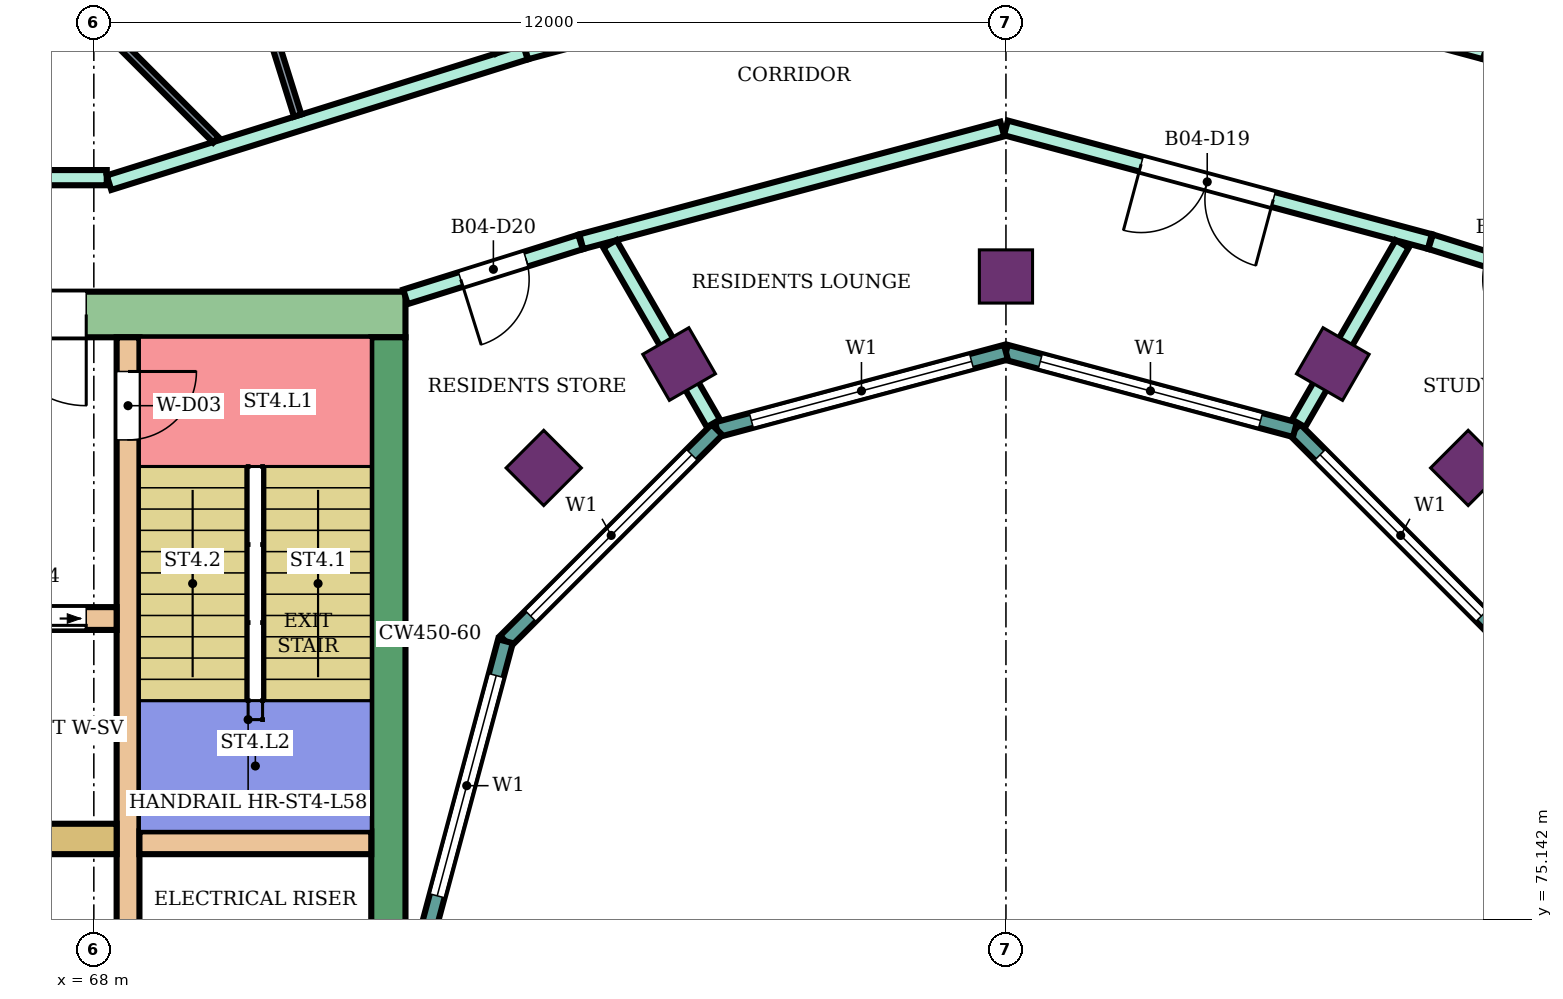
"""IFC4 building model, lengths in metres.
Left out: names, types, materials, properties, quantities, classifications, styles, units other than length and angle.
Written with IfcOpenShell. Run it as: python <this file> out.ifc"""

import sys

from ifc_helpers import new_model, si_unit, direction, frame, frame_2d, origin, origin_2d, place, context, subcontext, project, spatial, rectangle, extrude, element, fill, save


model = new_model("IFC4")
c1 = context("Model", 3, precision=1e-05, world=origin(), true_north=direction((0.0, 1.0)))
c2 = subcontext(c1, "Body", "Model", "MODEL_VIEW")
j1 = project(units=[si_unit("LENGTHUNIT", "METRE"), si_unit("PLANEANGLEUNIT", "RADIAN")], contexts=[c1])
p1 = place(None, origin())
s1 = spatial("IfcSite", under=j1, at=p1, CompositionType="ELEMENT")
p2 = place(p1, origin())
s2 = spatial("IfcBuilding", under=s1, at=p2, CompositionType="ELEMENT")
p3 = place(p2, frame((0.0, 0.0, 254.1)))
s3 = spatial("IfcBuildingStorey", under=s2, at=p3, CompositionType="ELEMENT", Elevation=254.1)
for number, where, z_axis, x_axis in (
    (1, (86.081, 81.081, 0.0), (0.0, 0.0, 1.0), (0.707, 0.707, 0.0)),
    (2, (84.3, 82.448, 0.0), (0.0, 0.0, 1.0), (0.5, 0.866, 0.0)),
    (3, (80.0, 83.6, 0.0), (0.0, 0.0, 1.0), (0.0, 1.0, 0.0)),
    (4, (75.7, 82.448, 0.0), (0.0, 0.0, 1.0), (-0.5, 0.866, 0.0)),
    (5, (73.919, 81.081, 0.0), (0.0, 0.0, 1.0), (-0.707, 0.707, 0.0)),
):
    element("IfcColumn", number, at=place(p3, frame(where, z_axis=z_axis, x_axis=x_axis)), inside=s3, PredefinedType="COLUMN", context=c2, shape_type="SweptSolid", body=[
        extrude(rectangle(XDim=0.7, YDim=0.7, at=origin_2d()), origin(), (0.0, 0.0, 1.0), 4.2),
    ])
p4 = place(p3, frame((72.1, 83.1, 0.0), z_axis=(0.0, 0.0, 1.0), x_axis=(-1.0, 0.0, 0.0)))
e6 = element("IfcWall", 6, at=p4, inside=s3, PredefinedType="SHEAR", context=c2, shape_type="SweptSolid", body=[
    extrude(rectangle(XDim=14.9, YDim=0.6, at=frame_2d((7.45, 0.0))), origin(), (0.0, 0.0, 1.0), 3.88),
])
p5 = place(p4, frame((4.2, 0.0, 0.0)))
e7 = element("IfcOpeningElement", 7, at=p5, cuts=e6, PredefinedType="OPENING", context=c2, shape_type="SweptSolid", body=[
    extrude(rectangle(XDim=2.4, YDim=2.4, at=frame_2d((1.2, 1.2))), frame((0.0, 0.31, 0.0), z_axis=(0.0, -1.0, 0.0), x_axis=(1.0, 0.0, 0.0)), (0.0, 0.0, 1.0), 0.62),
])
p6 = place(p3, frame((71.875, 82.8, 0.0), z_axis=(0.0, 0.0, 1.0), x_axis=(0.0, -1.0, 0.0)))
e8 = element("IfcWall", 8, at=p6, inside=s3, PredefinedType="SHEAR", context=c2, shape_type="SweptSolid", body=[
    extrude(rectangle(XDim=7.8, YDim=0.45, at=frame_2d((3.9, 0.0))), origin(), (0.0, 0.0, 1.0), 3.88),
])
p7 = place(p3, frame((68.45, 82.8, 0.0), z_axis=(0.0, 0.0, 1.0), x_axis=(0.0, -1.0, 0.0)))
e9 = element("IfcWall", 9, at=p7, inside=s3, PredefinedType="SHEAR", context=c2, shape_type="SweptSolid", body=[
    extrude(rectangle(XDim=7.8, YDim=0.3, at=frame_2d((3.9, 0.0))), origin(), (0.0, 0.0, 1.0), 3.88),
])
p8 = place(p7, frame((0.45, 0.0, 0.0)))
e10 = element("IfcOpeningElement", 10, at=p8, cuts=e9, PredefinedType="OPENING", context=c2, shape_type="SweptSolid", body=[
    extrude(rectangle(XDim=0.9, YDim=2.1, at=frame_2d((0.45, 1.05))), frame((0.0, 0.16, 0.0), z_axis=(0.0, -1.0, 0.0), x_axis=(1.0, 0.0, 0.0)), (0.0, 0.0, 1.0), 0.32),
])
p9 = place(p3, frame((71.65, 76.15, 0.0), z_axis=(0.0, 0.0, 1.0), x_axis=(-1.0, 0.0, 0.0)))
e11 = element("IfcWall", 11, at=p9, inside=s3, PredefinedType="SHEAR", context=c2, shape_type="SweptSolid", body=[
    extrude(rectangle(XDim=3.05, YDim=0.3, at=frame_2d((1.525, 0.0))), origin(), (0.0, 0.0, 1.0), 3.88),
])
p10 = place(p3, frame((68.3, 76.2, 0.0), z_axis=(0.0, 0.0, 1.0), x_axis=(-1.0, 0.0, 0.0)))
e12 = element("IfcWall", 12, at=p10, inside=s3, PredefinedType="SHEAR", context=c2, shape_type="SweptSolid", body=[
    extrude(rectangle(XDim=11.1, YDim=0.4, at=frame_2d((5.55, 0.0))), origin(), (0.0, 0.0, 1.0), 3.88),
])
p11 = place(p3, frame((68.3, 79.1, 0.0), z_axis=(0.0, 0.0, 1.0), x_axis=(-1.0, 0.0, 0.0)))
e13 = element("IfcWall", 13, at=p11, inside=s3, PredefinedType="SHEAR", context=c2, shape_type="SweptSolid", body=[
    extrude(rectangle(XDim=11.1, YDim=0.3, at=frame_2d((5.55, 0.0))), origin(), (0.0, 0.0, 1.0), 3.88),
])
p12 = place(p11, frame((0.4, 0.0, 0.0)))
e14 = element("IfcOpeningElement", 14, at=p12, cuts=e13, PredefinedType="OPENING", context=c2, shape_type="SweptSolid", body=[
    extrude(rectangle(XDim=1.4, YDim=2.1, at=frame_2d((0.7, 1.05))), frame((0.0, 0.16, 0.0), z_axis=(0.0, -1.0, 0.0), x_axis=(1.0, 0.0, 0.0)), (0.0, 0.0, 1.0), 0.32),
])
p13 = place(p11, frame((3.0, 0.0, 0.0)))
e15 = element("IfcOpeningElement", 15, at=p13, cuts=e13, PredefinedType="OPENING", context=c2, shape_type="SweptSolid", body=[
    extrude(rectangle(XDim=1.2, YDim=2.1, at=frame_2d((0.6, 1.05))), frame((0.0, 0.16, 0.0), z_axis=(0.0, -1.0, 0.0), x_axis=(1.0, 0.0, 0.0)), (0.0, 0.0, 1.0), 0.32),
])
p14 = place(p11, frame((5.77, 0.0, 0.0)))
e16 = element("IfcOpeningElement", 16, at=p14, cuts=e13, PredefinedType="OPENING", context=c2, shape_type="SweptSolid", body=[
    extrude(rectangle(XDim=0.9, YDim=2.1, at=frame_2d((0.45, 1.05))), frame((0.0, 0.16, 0.0), z_axis=(0.0, -1.0, 0.0), x_axis=(1.0, 0.0, 0.0)), (0.0, 0.0, 1.0), 0.32),
])
p15 = place(p11, frame((8.82, 0.0, 0.0)))
e17 = element("IfcOpeningElement", 17, at=p15, cuts=e13, PredefinedType="OPENING", context=c2, shape_type="SweptSolid", body=[
    extrude(rectangle(XDim=0.9, YDim=2.1, at=frame_2d((0.45, 1.05))), frame((0.0, 0.16, 0.0), z_axis=(0.0, -1.0, 0.0), x_axis=(1.0, 0.0, 0.0)), (0.0, 0.0, 1.0), 0.32),
])
p16 = place(p3, frame((86.585, 78.802, 0.0), z_axis=(0.0, 0.0, 1.0), x_axis=(-0.707106781187, 0.707106781187, 0.0)))
e18 = element("IfcWall", 18, at=p16, inside=s3, PredefinedType="NOTDEFINED", context=c2, shape_type="SweptSolid", body=[
    extrude(rectangle(XDim=3.936, YDim=0.2, at=frame_2d((1.968, 0.0))), origin(), (0.0, 0.0, 1.0), 4.2),
])
p17 = place(p16, frame((0.468, 0.0, 0.9)))
e19 = element("IfcOpeningElement", 19, at=p17, cuts=e18, PredefinedType="OPENING", context=c2, shape_type="SweptSolid", body=[
    extrude(rectangle(XDim=3.0, YDim=2.3, at=frame_2d((1.5, 1.15))), frame((0.0, 0.11, 0.0), z_axis=(0.0, -1.0, 0.0), x_axis=(1.0, 0.0, 0.0)), (0.0, 0.0, 1.0), 0.22),
])
p18 = place(p3, frame((83.802, 81.585, 0.0), z_axis=(0.0, 0.0, 1.0), x_axis=(-0.965933654434, 0.258789828301, 0.0)))
e20 = element("IfcWall", 20, at=p18, inside=s3, PredefinedType="NOTDEFINED", context=c2, shape_type="SweptSolid", body=[
    extrude(rectangle(XDim=3.936, YDim=0.2, at=frame_2d((1.968, 0.0))), origin(), (0.0, 0.0, 1.0), 4.2),
])
p19 = place(p18, frame((0.468, 0.0, 0.9)))
e21 = element("IfcOpeningElement", 21, at=p19, cuts=e20, PredefinedType="OPENING", context=c2, shape_type="SweptSolid", body=[
    extrude(rectangle(XDim=3.0, YDim=2.3, at=frame_2d((1.5, 1.15))), frame((0.0, 0.11, 0.0), z_axis=(0.0, -1.0, 0.0), x_axis=(1.0, 0.0, 0.0)), (0.0, 0.0, 1.0), 0.22),
])
p20 = place(p3, frame((80.0, 82.604, 0.0), z_axis=(0.0, 0.0, 1.0), x_axis=(-0.965933654434, -0.258789828301, 0.0)))
e22 = element("IfcWall", 22, at=p20, inside=s3, PredefinedType="NOTDEFINED", context=c2, shape_type="SweptSolid", body=[
    extrude(rectangle(XDim=3.936, YDim=0.2, at=frame_2d((1.968, 0.0))), origin(), (0.0, 0.0, 1.0), 4.2),
])
p21 = place(p20, frame((0.468, 0.0, 0.9)))
e23 = element("IfcOpeningElement", 23, at=p21, cuts=e22, PredefinedType="OPENING", context=c2, shape_type="SweptSolid", body=[
    extrude(rectangle(XDim=3.0, YDim=2.3, at=frame_2d((1.5, 1.15))), frame((0.0, 0.11, 0.0), z_axis=(0.0, -1.0, 0.0), x_axis=(1.0, 0.0, 0.0)), (0.0, 0.0, 1.0), 0.22),
])
p22 = place(p3, frame((76.198, 81.585, 0.0), z_axis=(0.0, 0.0, 1.0), x_axis=(-0.707106781187, -0.707106781187, 0.0)))
e24 = element("IfcWall", 24, at=p22, inside=s3, PredefinedType="NOTDEFINED", context=c2, shape_type="SweptSolid", body=[
    extrude(rectangle(XDim=3.936, YDim=0.2, at=frame_2d((1.968, 0.0))), origin(), (0.0, 0.0, 1.0), 4.2),
])
p23 = place(p22, frame((0.468, 0.0, 0.9)))
e25 = element("IfcOpeningElement", 25, at=p23, cuts=e24, PredefinedType="OPENING", context=c2, shape_type="SweptSolid", body=[
    extrude(rectangle(XDim=3.0, YDim=2.3, at=frame_2d((1.5, 1.15))), frame((0.0, 0.11, 0.0), z_axis=(0.0, -1.0, 0.0), x_axis=(1.0, 0.0, 0.0)), (0.0, 0.0, 1.0), 0.22),
])
p24 = place(p3, frame((73.415, 78.802, 0.0), z_axis=(0.0, 0.0, 1.0), x_axis=(-0.258789828301, -0.965933654434, 0.0)))
e26 = element("IfcWall", 26, at=p24, inside=s3, PredefinedType="NOTDEFINED", context=c2, shape_type="SweptSolid", body=[
    extrude(rectangle(XDim=3.936, YDim=0.2, at=frame_2d((1.968, 0.0))), origin(), (0.0, 0.0, 1.0), 4.2),
])
p25 = place(p24, frame((0.468, 0.0, 0.9)))
e27 = element("IfcOpeningElement", 27, at=p25, cuts=e26, PredefinedType="OPENING", context=c2, shape_type="SweptSolid", body=[
    extrude(rectangle(XDim=3.0, YDim=2.3, at=frame_2d((1.5, 1.15))), frame((0.0, 0.11, 0.0), z_axis=(0.0, -1.0, 0.0), x_axis=(1.0, 0.0, 0.0)), (0.0, 0.0, 1.0), 0.22),
])
p26 = place(p3, frame((65.2, 84.9, 0.0), z_axis=(0.0, 0.0, 1.0), x_axis=(1.0, 0.0, 0.0)))
e28 = element("IfcWall", 28, at=p26, inside=s3, PredefinedType="PARTITIONING", context=c2, shape_type="SweptSolid", body=[
    extrude(rectangle(XDim=2.97, YDim=0.2, at=frame_2d((1.485, 0.0))), origin(), (0.0, 0.0, 1.0), 3.75),
])
p27 = place(p3, frame((68.2, 84.834, 0.0), z_axis=(0.0, 0.0, 1.0), x_axis=(0.954260265251, 0.298977166624, 0.0)))
e29 = element("IfcWall", 29, at=p27, inside=s3, PredefinedType="PARTITIONING", context=c2, shape_type="SweptSolid", body=[
    extrude(rectangle(XDim=5.741, YDim=0.2, at=frame_2d((2.87, 0.0))), origin(), (0.0, 0.0, 1.0), 3.75),
])
p28 = place(p3, frame((72.1, 83.332, 0.0), z_axis=(0.0, 0.0, 1.0), x_axis=(0.954233106619, 0.299063836383, 0.0)))
e30 = element("IfcWall", 30, at=p28, inside=s3, PredefinedType="PARTITIONING", context=c2, shape_type="SweptSolid", body=[
    extrude(rectangle(XDim=2.414, YDim=0.2, at=frame_2d((1.207, 0.0))), origin(), (0.0, 0.0, 1.0), 3.75),
])
p29 = place(p28, frame((0.762, 0.0, 0.0)))
e31 = element("IfcOpeningElement", 31, at=p29, cuts=e30, PredefinedType="OPENING", context=c2, shape_type="SweptSolid", body=[
    extrude(rectangle(XDim=0.9, YDim=2.1, at=frame_2d((0.45, 1.05))), frame((0.0, 0.11, 0.0), z_axis=(0.0, -1.0, 0.0), x_axis=(1.0, 0.0, 0.0)), (0.0, 0.0, 1.0), 0.22),
])
p30 = place(p3, frame((73.687, 86.554, 0.0), z_axis=(0.0, 0.0, 1.0), x_axis=(0.965961994098, 0.258684027257, 0.0)))
e32 = element("IfcWall", 32, at=p30, inside=s3, PredefinedType="PARTITIONING", context=c2, shape_type="SweptSolid", body=[
    extrude(rectangle(XDim=6.486, YDim=0.2, at=frame_2d((3.243, 0.0))), origin(), (0.0, 0.0, 1.0), 3.75),
])
p31 = place(p30, frame((0.55, 0.0, 0.0)))
e33 = element("IfcOpeningElement", 33, at=p31, cuts=e32, PredefinedType="OPENING", context=c2, shape_type="SweptSolid", body=[
    extrude(rectangle(XDim=1.0, YDim=2.1, at=frame_2d((0.5, 1.05))), frame((0.0, 0.11, 0.0), z_axis=(0.0, -1.0, 0.0), x_axis=(1.0, 0.0, 0.0)), (0.0, 0.0, 1.0), 0.22),
])
p32 = place(p3, frame((74.413, 84.057, 0.0), z_axis=(0.0, 0.0, 1.0), x_axis=(0.965970849692, 0.258650956976, 0.0)))
e34 = element("IfcWall", 34, at=p32, inside=s3, PredefinedType="PARTITIONING", context=c2, shape_type="SweptSolid", body=[
    extrude(rectangle(XDim=5.734, YDim=0.2, at=frame_2d((2.867, 0.0))), origin(), (0.0, 0.0, 1.0), 3.75),
])
p33 = place(p3, frame((74.79, 84.028, 0.0), z_axis=(0.0, 0.0, 1.0), x_axis=(0.499859501914, -0.866106505198, 0.0)))
e35 = element("IfcWall", 35, at=p33, inside=s3, PredefinedType="PARTITIONING", context=c2, shape_type="SweptSolid", body=[
    extrude(rectangle(XDim=2.724, YDim=0.2, at=frame_2d((1.362, 0.0))), origin(), (0.0, 0.0, 1.0), 3.75),
])
p34 = place(p3, frame((80.0, 85.554, 0.0), z_axis=(0.0, 0.0, 1.0), x_axis=(0.965894438951, -0.258936155845, 0.0)))
e36 = element("IfcWall", 36, at=p34, inside=s3, PredefinedType="PARTITIONING", context=c2, shape_type="SweptSolid", body=[
    extrude(rectangle(XDim=5.774, YDim=0.2, at=frame_2d((2.887, 0.0))), origin(), (0.0, 0.0, 1.0), 3.75),
])
p35 = place(p34, frame((1.841, 0.0, 0.0)))
e37 = element("IfcOpeningElement", 37, at=p35, cuts=e36, PredefinedType="OPENING", context=c2, shape_type="SweptSolid", body=[
    extrude(rectangle(XDim=1.8, YDim=2.1, at=frame_2d((0.9, 1.05))), frame((0.0, 0.11, 0.0), z_axis=(0.0, -1.0, 0.0), x_axis=(1.0, 0.0, 0.0)), (0.0, 0.0, 1.0), 0.22),
])
p36 = place(p3, frame((80.048, 88.233, 0.0), z_axis=(0.0, 0.0, 1.0), x_axis=(0.965787353661, -0.259335280109, 0.0)))
e38 = element("IfcWall", 38, at=p36, inside=s3, PredefinedType="PARTITIONING", context=c2, shape_type="SweptSolid", body=[
    extrude(rectangle(XDim=6.476, YDim=0.2, at=frame_2d((3.238, 0.0))), origin(), (0.0, 0.0, 1.0), 3.75),
])
p37 = place(p36, frame((4.936, 0.0, 0.0)))
e39 = element("IfcOpeningElement", 39, at=p37, cuts=e38, PredefinedType="OPENING", context=c2, shape_type="SweptSolid", body=[
    extrude(rectangle(XDim=1.0, YDim=2.1, at=frame_2d((0.5, 1.05))), frame((0.0, 0.11, 0.0), z_axis=(0.0, -1.0, 0.0), x_axis=(1.0, 0.0, 0.0)), (0.0, 0.0, 1.0), 0.22),
])
p38 = place(p3, frame((83.85, 81.668, 0.0), z_axis=(0.0, 0.0, 1.0), x_axis=(0.500099931433, 0.865967700657, 0.0)))
e40 = element("IfcWall", 40, at=p38, inside=s3, PredefinedType="PARTITIONING", context=c2, shape_type="SweptSolid", body=[
    extrude(rectangle(XDim=2.725, YDim=0.2, at=frame_2d((1.362, 0.0))), origin(), (0.0, 0.0, 1.0), 3.75),
])
p39 = place(p3, frame((85.587, 84.057, 0.0), z_axis=(0.0, 0.0, 1.0), x_axis=(0.954239513179, -0.299043393987, 0.0)))
e41 = element("IfcWall", 41, at=p39, inside=s3, PredefinedType="PARTITIONING", context=c2, shape_type="SweptSolid", body=[
    extrude(rectangle(XDim=2.424, YDim=0.2, at=frame_2d((1.212, 0.0))), origin(), (0.0, 0.0, 1.0), 3.75),
])
p40 = place(p39, frame((0.762, 0.0, 0.0)))
e42 = element("IfcOpeningElement", 42, at=p40, cuts=e41, PredefinedType="OPENING", context=c2, shape_type="SweptSolid", body=[
    extrude(rectangle(XDim=0.9, YDim=2.1, at=frame_2d((0.45, 1.05))), frame((0.0, 0.11, 0.0), z_axis=(0.0, -1.0, 0.0), x_axis=(1.0, 0.0, 0.0)), (0.0, 0.0, 1.0), 0.22),
])
p41 = place(p3, frame((63.597, 91.407, 0.0), z_axis=(0.0, 0.0, 1.0), x_axis=(0.70700623685, -0.707207311228, 0.0)))
e43 = element("IfcWall", 43, at=p41, inside=s3, PredefinedType="PARTITIONING", context=c2, shape_type="SweptSolid", body=[
    extrude(rectangle(XDim=8.499, YDim=0.1, at=frame_2d((4.25, 0.0))), origin(), (0.0, 0.0, 1.0), 3.75),
])
p42 = place(p41, frame((1.632, 0.0, 0.0)))
e44 = element("IfcOpeningElement", 44, at=p42, cuts=e43, PredefinedType="OPENING", context=c2, shape_type="SweptSolid", body=[
    extrude(rectangle(XDim=0.9, YDim=2.1, at=frame_2d((0.45, 1.05))), frame((0.0, 0.06, 0.0), z_axis=(0.0, -1.0, 0.0), x_axis=(1.0, 0.0, 0.0)), (0.0, 0.0, 1.0), 0.12),
])
p43 = place(p3, frame((67.111, 97.347, 0.0), z_axis=(0.0, 0.0, 1.0), x_axis=(0.499428303955, -0.866355221147, 0.0)))
e45 = element("IfcWall", 45, at=p43, inside=s3, PredefinedType="PARTITIONING", context=c2, shape_type="SweptSolid", body=[
    extrude(rectangle(XDim=12.456, YDim=0.1, at=frame_2d((6.228, 0.0))), origin(), (0.0, 0.0, 1.0), 3.75),
])
p44 = place(p43, frame((2.538, 0.0, 0.0)))
e46 = element("IfcOpeningElement", 46, at=p44, cuts=e45, PredefinedType="OPENING", context=c2, shape_type="SweptSolid", body=[
    extrude(rectangle(XDim=0.9, YDim=2.1, at=frame_2d((0.45, 1.05))), frame((0.0, 0.06, 0.0), z_axis=(0.0, -1.0, 0.0), x_axis=(1.0, 0.0, 0.0)), (0.0, 0.0, 1.0), 0.12),
])
p45 = place(p43, frame((10.055, 0.0, 0.0)))
e47 = element("IfcOpeningElement", 47, at=p45, cuts=e45, PredefinedType="OPENING", context=c2, shape_type="SweptSolid", body=[
    extrude(rectangle(XDim=0.8, YDim=2.1, at=frame_2d((0.4, 1.05))), frame((0.0, 0.06, 0.0), z_axis=(0.0, -1.0, 0.0), x_axis=(1.0, 0.0, 0.0)), (0.0, 0.0, 1.0), 0.12),
])
p46 = place(p3, frame((69.501, 89.486, 0.0), z_axis=(0.0, 0.0, 1.0), x_axis=(0.298971609069, -0.954262006459, 0.0)))
e48 = element("IfcWall", 48, at=p46, inside=s3, PredefinedType="PARTITIONING", context=c2, shape_type="SweptSolid", body=[
    extrude(rectangle(XDim=3.951, YDim=0.1, at=frame_2d((1.975, 0.0))), origin(), (0.0, 0.0, 1.0), 3.75),
])
p47 = place(p17, origin())
e49 = element("IfcWindow", 49, at=p47, inside=s3, PartitioningType="SINGLE_PANEL", PredefinedType="WINDOW", context=c2, shape_type="SweptSolid", body=[
    extrude(rectangle(XDim=3.0, YDim=2.3, at=frame_2d((1.5, 1.15))), frame((0.0, 0.03, 0.0), z_axis=(0.0, -1.0, 0.0), x_axis=(1.0, 0.0, 0.0)), (0.0, 0.0, 1.0), 0.06),
])
fill(e19, e49)
p48 = place(p19, origin())
e50 = element("IfcWindow", 50, at=p48, inside=s3, PartitioningType="SINGLE_PANEL", PredefinedType="WINDOW", context=c2, shape_type="SweptSolid", body=[
    extrude(rectangle(XDim=3.0, YDim=2.3, at=frame_2d((1.5, 1.15))), frame((0.0, 0.03, 0.0), z_axis=(0.0, -1.0, 0.0), x_axis=(1.0, 0.0, 0.0)), (0.0, 0.0, 1.0), 0.06),
])
fill(e21, e50)
p49 = place(p21, origin())
e51 = element("IfcWindow", 51, at=p49, inside=s3, PartitioningType="SINGLE_PANEL", PredefinedType="WINDOW", context=c2, shape_type="SweptSolid", body=[
    extrude(rectangle(XDim=3.0, YDim=2.3, at=frame_2d((1.5, 1.15))), frame((0.0, 0.03, 0.0), z_axis=(0.0, -1.0, 0.0), x_axis=(1.0, 0.0, 0.0)), (0.0, 0.0, 1.0), 0.06),
])
fill(e23, e51)
p50 = place(p23, origin())
e52 = element("IfcWindow", 52, at=p50, inside=s3, PartitioningType="SINGLE_PANEL", PredefinedType="WINDOW", context=c2, shape_type="SweptSolid", body=[
    extrude(rectangle(XDim=3.0, YDim=2.3, at=frame_2d((1.5, 1.15))), frame((0.0, 0.03, 0.0), z_axis=(0.0, -1.0, 0.0), x_axis=(1.0, 0.0, 0.0)), (0.0, 0.0, 1.0), 0.06),
])
fill(e25, e52)
p51 = place(p25, origin())
e53 = element("IfcWindow", 53, at=p51, inside=s3, PartitioningType="SINGLE_PANEL", PredefinedType="WINDOW", context=c2, shape_type="SweptSolid", body=[
    extrude(rectangle(XDim=3.0, YDim=2.3, at=frame_2d((1.5, 1.15))), frame((0.0, 0.03, 0.0), z_axis=(0.0, -1.0, 0.0), x_axis=(1.0, 0.0, 0.0)), (0.0, 0.0, 1.0), 0.06),
])
fill(e27, e53)
p52 = place(p35, frame((1.8, 0.0, 0.0), z_axis=(0.0, 0.0, 1.0), x_axis=(-1.0, 0.0, 0.0)))
e54 = element("IfcDoor", 54, at=p52, inside=s3, OperationType="DOUBLE_DOOR_SINGLE_SWING", PredefinedType="DOOR", context=c2, shape_type="SweptSolid", body=[
    extrude(rectangle(XDim=1.8, YDim=2.1, at=frame_2d((0.9, 1.05))), frame((0.0, 0.025, 0.0), z_axis=(0.0, -1.0, 0.0), x_axis=(1.0, 0.0, 0.0)), (0.0, 0.0, 1.0), 0.05),
])
fill(e37, e54)
p53 = place(p29, frame((0.9, 0.0, 0.0), z_axis=(0.0, 0.0, 1.0), x_axis=(-1.0, 0.0, 0.0)))
e55 = element("IfcDoor", 55, at=p53, inside=s3, OperationType="SINGLE_SWING_RIGHT", PredefinedType="DOOR", context=c2, shape_type="SweptSolid", body=[
    extrude(rectangle(XDim=0.9, YDim=2.1, at=frame_2d((0.45, 1.05))), frame((0.0, 0.025, 0.0), z_axis=(0.0, -1.0, 0.0), x_axis=(1.0, 0.0, 0.0)), (0.0, 0.0, 1.0), 0.05),
])
fill(e31, e55)
p54 = place(p8, origin())
e56 = element("IfcDoor", 56, at=p54, inside=s3, OperationType="SINGLE_SWING_LEFT", PredefinedType="DOOR", context=c2, shape_type="SweptSolid", body=[
    extrude(rectangle(XDim=0.9, YDim=2.1, at=frame_2d((0.45, 1.05))), frame((0.0, 0.025, 0.0), z_axis=(0.0, -1.0, 0.0), x_axis=(1.0, 0.0, 0.0)), (0.0, 0.0, 1.0), 0.05),
])
fill(e10, e56)
p55 = place(p12, origin())
e57 = element("IfcDoor", 57, at=p55, inside=s3, OperationType="DOUBLE_DOOR_SLIDING", PredefinedType="DOOR", context=c2, shape_type="SweptSolid", body=[
    extrude(rectangle(XDim=1.4, YDim=2.1, at=frame_2d((0.7, 1.05))), frame((0.0, 0.025, 0.0), z_axis=(0.0, -1.0, 0.0), x_axis=(1.0, 0.0, 0.0)), (0.0, 0.0, 1.0), 0.05),
])
fill(e14, e57)
p56 = place(p5, origin())
e58 = element("IfcDoor", 58, at=p56, inside=s3, OperationType="DOUBLE_DOOR_SINGLE_SWING", PredefinedType="DOOR", context=c2, shape_type="SweptSolid", body=[
    extrude(rectangle(XDim=2.4, YDim=2.4, at=frame_2d((1.2, 1.2))), frame((0.0, 0.025, 0.0), z_axis=(0.0, -1.0, 0.0), x_axis=(1.0, 0.0, 0.0)), (0.0, 0.0, 1.0), 0.05),
])
fill(e7, e58)
save(model, sys.argv[1])
